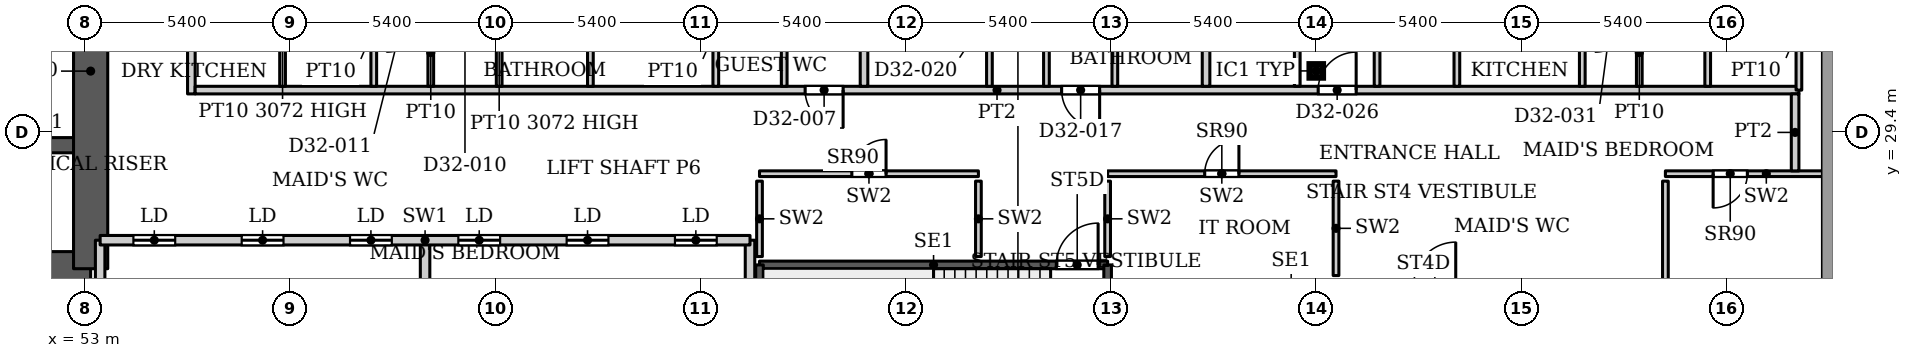
"""IFC4 building model, lengths in metres.
Left out: names, types, materials, properties, quantities, classifications, styles, units other than length and angle.
Written with IfcOpenShell. Run it as: python <this file> out.ifc"""

import sys

from ifc_helpers import new_model, si_unit, direction, frame, frame_2d, origin, origin_2d, place, context, subcontext, project, spatial, rectangle, hollow_rectangle, extrude, source, transform, mapped, element, fill, save


model = new_model("IFC4")
c1 = context("Model", 3, precision=1e-05, world=origin(), true_north=direction((0.0, 1.0)))
c2 = subcontext(c1, "Body", "Model", "MODEL_VIEW")
j1 = project(units=[si_unit("LENGTHUNIT", "METRE"), si_unit("PLANEANGLEUNIT", "RADIAN")], contexts=[c1])
p1 = place(None, origin())
s1 = spatial("IfcSite", under=j1, at=p1, CompositionType="ELEMENT")
p2 = place(p1, origin())
s2 = spatial("IfcBuilding", under=s1, at=p2, CompositionType="ELEMENT")
p3 = place(p2, frame((0.0, 0.0, 140.9)))
s3 = spatial("IfcBuildingStorey", under=s2, at=p3, CompositionType="ELEMENT", Elevation=140.9)
p4 = place(p3, frame((85.4, 31.005, 0.0), z_axis=(0.0, 0.0, 1.0), x_axis=(1.0, 0.0, 0.0)))
e1 = element("IfcColumn", 1, at=p4, inside=s3, PredefinedType="COLUMN", context=c2, shape_type="SweptSolid", body=[
    extrude(hollow_rectangle(XDim=0.356, YDim=0.356, WallThickness=0.016, InnerFilletRadius=0.016, OuterFilletRadius=0.032, at=origin_2d()), origin(), (0.0, 0.0, 1.0), 3.9),
])
p5 = place(p3, frame((34.75, 25.8, 0.0), z_axis=(0.0, 0.0, 1.0), x_axis=(1.0, 0.0, 0.0)))
e2 = element("IfcWall", 2, at=p5, inside=s3, PredefinedType="SHEAR", context=c2, shape_type="SweptSolid", body=[
    extrude(rectangle(XDim=18.4, YDim=0.9, at=frame_2d((9.2, 0.0))), origin(), (0.0, 0.0, 1.0), 3.9),
])
p6 = place(p3, frame((34.75, 29.05, 0.0), z_axis=(0.0, 0.0, 1.0), x_axis=(1.0, 0.0, 0.0)))
e3 = element("IfcWall", 3, at=p6, inside=s3, PredefinedType="SHEAR", context=c2, shape_type="SweptSolid", body=[
    extrude(rectangle(XDim=18.4, YDim=0.4, at=frame_2d((9.2, 0.0))), origin(), (0.0, 0.0, 1.0), 3.9),
])
p7 = place(p6, frame((15.125, 0.0, 0.0)))
e4 = element("IfcOpeningElement", 4, at=p7, cuts=e3, PredefinedType="OPENING", context=c2, shape_type="SweptSolid", body=[
    extrude(rectangle(XDim=1.1, YDim=2.2, at=frame_2d((0.55, 1.1))), frame((0.0, 0.21, 0.0), z_axis=(0.0, -1.0, 0.0), x_axis=(1.0, 0.0, 0.0)), (0.0, 0.0, 1.0), 0.42),
])
p8 = place(p3, frame((53.15, 25.8, 0.0), z_axis=(0.0, 0.0, 1.0), x_axis=(0.0, 1.0, 0.0)))
e5 = element("IfcWall", 5, at=p8, inside=s3, PredefinedType="SHEAR", context=c2, shape_type="SweptSolid", body=[
    extrude(rectangle(XDim=10.4, YDim=0.9, at=frame_2d((5.2, 0.0))), origin(), (0.0, 0.0, 1.0), 3.9),
])
p9 = place(p3, frame((70.75, 25.9, 0.0), z_axis=(0.0, 0.0, 1.0), x_axis=(1.0, 0.0, 0.0)))
e6 = element("IfcWall", 6, at=p9, inside=s3, PredefinedType="SHEAR", context=c2, shape_type="SweptSolid", body=[
    extrude(rectangle(XDim=9.16, YDim=0.2, at=frame_2d((4.58, 0.0))), origin(), (0.0, 0.0, 1.0), 3.9),
])
p10 = place(p9, frame((7.81, 0.0, 0.0)))
e7 = element("IfcOpeningElement", 7, at=p10, cuts=e6, PredefinedType="OPENING", context=c2, shape_type="SweptSolid", body=[
    extrude(rectangle(XDim=1.1, YDim=2.2, at=frame_2d((0.55, 1.1))), frame((0.0, 0.11, 0.0), z_axis=(0.0, -1.0, 0.0), x_axis=(1.0, 0.0, 0.0)), (0.0, 0.0, 1.0), 0.22),
])
for number, where, z_axis, x_axis in (
    (8, (70.75, 22.75, 0.0), (0.0, 0.0, 1.0), (0.0, 1.0, 0.0)),
    (9, (79.91, 22.75, 0.0), (0.0, 0.0, 1.0), (0.0, 1.0, 0.0)),
):
    element("IfcWall", number, at=place(p3, frame(where, z_axis=z_axis, x_axis=x_axis)), inside=s3, PredefinedType="SHEAR", context=c2, shape_type="SweptSolid", body=[
        extrude(rectangle(XDim=3.15, YDim=0.2, at=frame_2d((1.575, 0.0))), origin(), (0.0, 0.0, 1.0), 3.9),
    ])
for number, where, z_axis, x_axis in (
    (10, (53.4, 23.7, 0.0), (0.0, 0.0, 1.0), (0.0, 1.0, 0.0)),
    (11, (61.95, 23.7, 0.0), (0.0, 0.0, 1.0), (0.0, 1.0, 0.0)),
    (12, (70.5, 23.7, 0.0), (0.0, 0.0, 1.0), (0.0, 1.0, 0.0)),
):
    element("IfcWall", number, at=place(p3, frame(where, z_axis=z_axis, x_axis=x_axis)), inside=s3, PredefinedType="PARTITIONING", context=c2, shape_type="SweptSolid", body=[
        extrude(rectangle(XDim=2.85, YDim=0.25, at=frame_2d((1.425, 0.0))), origin(), (0.0, 0.0, 1.0), 3.9),
    ])
p11 = place(p3, frame((53.4, 26.55, 0.0), z_axis=(0.0, 0.0, 1.0), x_axis=(1.0, 0.0, 0.0)))
e13 = element("IfcWall", 13, at=p11, inside=s3, PredefinedType="PARTITIONING", context=c2, shape_type="SweptSolid", body=[
    extrude(rectangle(XDim=17.1, YDim=0.25, at=frame_2d((8.55, 0.0))), origin(), (0.0, 0.0, 1.0), 3.9),
])
p12 = place(p11, frame((0.875, 0.0, 0.0)))
e14 = element("IfcOpeningElement", 14, at=p12, cuts=e13, PredefinedType="OPENING", context=c2, shape_type="SweptSolid", body=[
    extrude(rectangle(XDim=1.1, YDim=2.2, at=frame_2d((0.55, 1.1))), frame((0.0, 0.135, 0.0), z_axis=(0.0, -1.0, 0.0), x_axis=(1.0, 0.0, 0.0)), (0.0, 0.0, 1.0), 0.27),
])
p13 = place(p11, frame((3.725, 0.0, 0.0)))
e15 = element("IfcOpeningElement", 15, at=p13, cuts=e13, PredefinedType="OPENING", context=c2, shape_type="SweptSolid", body=[
    extrude(rectangle(XDim=1.1, YDim=2.2, at=frame_2d((0.55, 1.1))), frame((0.0, 0.135, 0.0), z_axis=(0.0, -1.0, 0.0), x_axis=(1.0, 0.0, 0.0)), (0.0, 0.0, 1.0), 0.27),
])
p14 = place(p11, frame((6.575, 0.0, 0.0)))
e16 = element("IfcOpeningElement", 16, at=p14, cuts=e13, PredefinedType="OPENING", context=c2, shape_type="SweptSolid", body=[
    extrude(rectangle(XDim=1.1, YDim=2.2, at=frame_2d((0.55, 1.1))), frame((0.0, 0.135, 0.0), z_axis=(0.0, -1.0, 0.0), x_axis=(1.0, 0.0, 0.0)), (0.0, 0.0, 1.0), 0.27),
])
p15 = place(p11, frame((9.425, 0.0, 0.0)))
e17 = element("IfcOpeningElement", 17, at=p15, cuts=e13, PredefinedType="OPENING", context=c2, shape_type="SweptSolid", body=[
    extrude(rectangle(XDim=1.1, YDim=2.2, at=frame_2d((0.55, 1.1))), frame((0.0, 0.135, 0.0), z_axis=(0.0, -1.0, 0.0), x_axis=(1.0, 0.0, 0.0)), (0.0, 0.0, 1.0), 0.27),
])
p16 = place(p11, frame((12.275, 0.0, 0.0)))
e18 = element("IfcOpeningElement", 18, at=p16, cuts=e13, PredefinedType="OPENING", context=c2, shape_type="SweptSolid", body=[
    extrude(rectangle(XDim=1.1, YDim=2.2, at=frame_2d((0.55, 1.1))), frame((0.0, 0.135, 0.0), z_axis=(0.0, -1.0, 0.0), x_axis=(1.0, 0.0, 0.0)), (0.0, 0.0, 1.0), 0.27),
])
p17 = place(p11, frame((15.125, 0.0, 0.0)))
e19 = element("IfcOpeningElement", 19, at=p17, cuts=e13, PredefinedType="OPENING", context=c2, shape_type="SweptSolid", body=[
    extrude(rectangle(XDim=1.1, YDim=2.2, at=frame_2d((0.55, 1.1))), frame((0.0, 0.135, 0.0), z_axis=(0.0, -1.0, 0.0), x_axis=(1.0, 0.0, 0.0)), (0.0, 0.0, 1.0), 0.27),
])
p18 = place(p3, frame((70.75, 28.3, 0.0), z_axis=(0.0, 0.0, 1.0), x_axis=(1.0, 0.0, 0.0)))
e20 = element("IfcWall", 20, at=p18, inside=s3, PredefinedType="PARTITIONING", context=c2, shape_type="SweptSolid", body=[
    extrude(rectangle(XDim=5.76, YDim=0.15, at=frame_2d((2.88, 0.0))), origin(), (0.0, 0.0, 1.0), 3.9),
])
p19 = place(p18, frame((2.43, 0.0, 0.0)))
e21 = element("IfcOpeningElement", 21, at=p19, cuts=e20, PredefinedType="OPENING", context=c2, shape_type="SweptSolid", body=[
    extrude(rectangle(XDim=0.9, YDim=2.2, at=frame_2d((0.45, 1.1))), frame((0.0, 0.085, 0.0), z_axis=(0.0, -1.0, 0.0), x_axis=(1.0, 0.0, 0.0)), (0.0, 0.0, 1.0), 0.17),
])
for number, where, z_axis, x_axis in (
    (22, (70.75, 26.12, 0.0), (0.0, 0.0, 1.0), (0.0, 1.0, 0.0)),
    (23, (76.51, 26.12, 0.0), (0.0, 0.0, 1.0), (0.0, 1.0, 0.0)),
):
    element("IfcWall", number, at=place(p3, frame(where, z_axis=z_axis, x_axis=x_axis)), inside=s3, PredefinedType="PARTITIONING", context=c2, shape_type="SweptSolid", body=[
        extrude(rectangle(XDim=1.985, YDim=0.15, at=frame_2d((0.992, 0.0))), origin(), (0.0, 0.0, 1.0), 3.9),
    ])
p20 = place(p3, frame((79.91, 28.3, 0.0), z_axis=(0.0, 0.0, 1.0), x_axis=(1.0, 0.0, 0.0)))
e24 = element("IfcWall", 24, at=p20, inside=s3, PredefinedType="PARTITIONING", context=c2, shape_type="SweptSolid", body=[
    extrude(rectangle(XDim=6.01, YDim=0.15, at=frame_2d((3.005, 0.0))), origin(), (0.0, 0.0, 1.0), 3.9),
])
p21 = place(p20, frame((2.555, 0.0, 0.0)))
e25 = element("IfcOpeningElement", 25, at=p21, cuts=e24, PredefinedType="OPENING", context=c2, shape_type="SweptSolid", body=[
    extrude(rectangle(XDim=0.9, YDim=2.2, at=frame_2d((0.45, 1.1))), frame((0.0, 0.085, 0.0), z_axis=(0.0, -1.0, 0.0), x_axis=(1.0, 0.0, 0.0)), (0.0, 0.0, 1.0), 0.17),
])
p22 = place(p3, frame((79.91, 26.12, 0.0), z_axis=(0.0, 0.0, 1.0), x_axis=(0.0, 1.0, 0.0)))
e26 = element("IfcWall", 26, at=p22, inside=s3, PredefinedType="PARTITIONING", context=c2, shape_type="SweptSolid", body=[
    extrude(rectangle(XDim=1.985, YDim=0.15, at=frame_2d((0.992, 0.0))), origin(), (0.0, 0.0, 1.0), 3.9),
])
p23 = place(p3, frame((85.92, 25.62, 0.0), z_axis=(0.0, 0.0, 1.0), x_axis=(0.0, 1.0, 0.0)))
e27 = element("IfcWall", 27, at=p23, inside=s3, PredefinedType="PARTITIONING", context=c2, shape_type="SweptSolid", body=[
    extrude(rectangle(XDim=2.485, YDim=0.15, at=frame_2d((1.242, 0.0))), origin(), (0.0, 0.0, 1.0), 3.9),
])
p24 = place(p3, frame((94.587, 28.3, 0.0), z_axis=(0.0, 0.0, 1.0), x_axis=(1.0, 0.0, 0.0)))
e28 = element("IfcWall", 28, at=p24, inside=s3, PredefinedType="PARTITIONING", context=c2, shape_type="SweptSolid", body=[
    extrude(rectangle(XDim=5.311, YDim=0.15, at=frame_2d((2.656, 0.0))), origin(), (0.0, 0.0, 1.0), 3.9),
])
p25 = place(p24, frame((1.256, 0.0, 0.0)))
e29 = element("IfcOpeningElement", 29, at=p25, cuts=e28, PredefinedType="OPENING", context=c2, shape_type="SweptSolid", body=[
    extrude(rectangle(XDim=0.9, YDim=2.2, at=frame_2d((0.45, 1.1))), frame((0.0, 0.085, 0.0), z_axis=(0.0, -1.0, 0.0), x_axis=(1.0, 0.0, 0.0)), (0.0, 0.0, 1.0), 0.17),
])
p26 = place(p3, frame((94.587, 21.293, 0.0), z_axis=(0.0, 0.0, 1.0), x_axis=(0.0, 1.0, 0.0)))
e30 = element("IfcWall", 30, at=p26, inside=s3, PredefinedType="PARTITIONING", context=c2, shape_type="SweptSolid", body=[
    extrude(rectangle(XDim=6.812, YDim=0.15, at=frame_2d((3.406, 0.0))), origin(), (0.0, 0.0, 1.0), 3.9),
])
p27 = place(p3, frame((55.8, 30.4, 0.0), z_axis=(0.0, 0.0, 1.0), x_axis=(0.0, 1.0, 0.0)))
e31 = element("IfcWall", 31, at=p27, inside=s3, PredefinedType="PARTITIONING", context=c2, shape_type="SweptSolid", body=[
    extrude(rectangle(XDim=13.5, YDim=0.2, at=frame_2d((6.75, 0.0))), origin(), (0.0, 0.0, 1.0), 3.6),
])
p28 = place(p3, frame((55.9, 30.5, 0.0), z_axis=(0.0, 0.0, 1.0), x_axis=(1.0, 0.0, 0.0)))
e32 = element("IfcWall", 32, at=p28, inside=s3, PredefinedType="PARTITIONING", context=c2, shape_type="SweptSolid", body=[
    extrude(rectangle(XDim=42.2, YDim=0.2, at=frame_2d((21.1, 0.0))), origin(), (0.0, 0.0, 1.0), 3.6),
])
p29 = place(p28, frame((16.05, 0.0, 0.0)))
e33 = element("IfcOpeningElement", 33, at=p29, cuts=e32, PredefinedType="OPENING", context=c2, shape_type="SweptSolid", body=[
    extrude(rectangle(XDim=1.0, YDim=2.1, at=frame_2d((0.5, 1.05))), frame((0.0, 0.11, 0.0), z_axis=(0.0, -1.0, 0.0), x_axis=(1.0, 0.0, 0.0)), (0.0, 0.0, 1.0), 0.22),
])
p30 = place(p28, frame((22.8, 0.0, 0.0)))
e34 = element("IfcOpeningElement", 34, at=p30, cuts=e32, PredefinedType="OPENING", context=c2, shape_type="SweptSolid", body=[
    extrude(rectangle(XDim=1.0, YDim=2.1, at=frame_2d((0.5, 1.05))), frame((0.0, 0.11, 0.0), z_axis=(0.0, -1.0, 0.0), x_axis=(1.0, 0.0, 0.0)), (0.0, 0.0, 1.0), 0.22),
])
p31 = place(p28, frame((29.55, 0.0, 0.0)))
e35 = element("IfcOpeningElement", 35, at=p31, cuts=e32, PredefinedType="OPENING", context=c2, shape_type="SweptSolid", body=[
    extrude(rectangle(XDim=1.0, YDim=2.1, at=frame_2d((0.5, 1.05))), frame((0.0, 0.11, 0.0), z_axis=(0.0, -1.0, 0.0), x_axis=(1.0, 0.0, 0.0)), (0.0, 0.0, 1.0), 0.22),
])
p32 = place(p3, frame((58.2, 30.6, 0.0), z_axis=(0.0, 0.0, 1.0), x_axis=(0.0, 1.0, 0.0)))
e36 = element("IfcWall", 36, at=p32, inside=s3, PredefinedType="PARTITIONING", context=c2, shape_type="SweptSolid", body=[
    extrude(rectangle(XDim=3.025, YDim=0.15, at=frame_2d((1.512, 0.0))), origin(), (0.0, 0.0, 1.0), 3.072),
])
p33 = place(p3, frame((60.6, 30.6, 0.0), z_axis=(0.0, 0.0, 1.0), x_axis=(0.0, 1.0, 0.0)))
e37 = element("IfcWall", 37, at=p33, inside=s3, PredefinedType="PARTITIONING", context=c2, shape_type="SweptSolid", body=[
    extrude(rectangle(XDim=3.025, YDim=0.15, at=frame_2d((1.512, 0.0))), origin(), (0.0, 0.0, 1.0), 3.6),
])
p34 = place(p3, frame((62.1, 30.6, 0.0), z_axis=(0.0, 0.0, 1.0), x_axis=(0.0, 1.0, 0.0)))
e38 = element("IfcWall", 38, at=p34, inside=s3, PredefinedType="PARTITIONING", context=c2, shape_type="SweptSolid", body=[
    extrude(rectangle(XDim=1.775, YDim=0.15, at=frame_2d((0.887, 0.0))), origin(), (0.0, 0.0, 1.0), 3.6),
])
p35 = place(p3, frame((63.9, 30.6, 0.0), z_axis=(0.0, 0.0, 1.0), x_axis=(0.0, 1.0, 0.0)))
e39 = element("IfcWall", 39, at=p35, inside=s3, PredefinedType="PARTITIONING", context=c2, shape_type="SweptSolid", body=[
    extrude(rectangle(XDim=3.025, YDim=0.15, at=frame_2d((1.512, 0.0))), origin(), (0.0, 0.0, 1.0), 3.072),
])
for number, where, z_axis, x_axis in (
    (40, (66.3, 30.6, 0.0), (0.0, 0.0, 1.0), (0.0, 1.0, 0.0)),
    (41, (69.6, 30.6, 0.0), (0.0, 0.0, 1.0), (0.0, 1.0, 0.0)),
    (42, (71.4, 30.6, 0.0), (0.0, 0.0, 1.0), (0.0, 1.0, 0.0)),
):
    element("IfcWall", number, at=place(p3, frame(where, z_axis=z_axis, x_axis=x_axis)), inside=s3, PredefinedType="PARTITIONING", context=c2, shape_type="SweptSolid", body=[
        extrude(rectangle(XDim=3.025, YDim=0.15, at=frame_2d((1.512, 0.0))), origin(), (0.0, 0.0, 1.0), 3.6),
    ])
p36 = place(p3, frame((73.5, 30.6, 0.0), z_axis=(0.0, 0.0, 1.0), x_axis=(0.0, 1.0, 0.0)))
e43 = element("IfcWall", 43, at=p36, inside=s3, PredefinedType="PARTITIONING", context=c2, shape_type="SweptSolid", body=[
    extrude(rectangle(XDim=13.3, YDim=0.2, at=frame_2d((6.65, 0.0))), origin(), (0.0, 0.0, 1.0), 3.6),
])
for number, where, z_axis, x_axis in (
    (44, (76.8, 30.6, 0.0), (0.0, 0.0, 1.0), (0.0, 1.0, 0.0)),
    (45, (78.3, 30.6, 0.0), (0.0, 0.0, 1.0), (0.0, 1.0, 0.0)),
):
    element("IfcWall", number, at=place(p3, frame(where, z_axis=z_axis, x_axis=x_axis)), inside=s3, PredefinedType="PARTITIONING", context=c2, shape_type="SweptSolid", body=[
        extrude(rectangle(XDim=3.025, YDim=0.15, at=frame_2d((1.512, 0.0))), origin(), (0.0, 0.0, 1.0), 3.6),
    ])
p37 = place(p3, frame((80.1, 30.6, 0.0), z_axis=(0.0, 0.0, 1.0), x_axis=(0.0, 1.0, 0.0)))
e46 = element("IfcWall", 46, at=p37, inside=s3, PredefinedType="PARTITIONING", context=c2, shape_type="SweptSolid", body=[
    extrude(rectangle(XDim=3.175, YDim=0.15, at=frame_2d((1.587, 0.0))), origin(), (0.0, 0.0, 1.0), 3.6),
])
p38 = place(p3, frame((82.5, 30.6, 0.0), z_axis=(0.0, 0.0, 1.0), x_axis=(0.0, 1.0, 0.0)))
e47 = element("IfcWall", 47, at=p38, inside=s3, PredefinedType="PARTITIONING", context=c2, shape_type="SweptSolid", body=[
    extrude(rectangle(XDim=13.3, YDim=0.2, at=frame_2d((6.65, 0.0))), origin(), (0.0, 0.0, 1.0), 3.6),
])
p39 = place(p3, frame((84.9, 30.6, 0.0), z_axis=(0.0, 0.0, 1.0), x_axis=(0.0, 1.0, 0.0)))
e48 = element("IfcWall", 48, at=p39, inside=s3, PredefinedType="PARTITIONING", context=c2, shape_type="SweptSolid", body=[
    extrude(rectangle(XDim=3.175, YDim=0.15, at=frame_2d((1.587, 0.0))), origin(), (0.0, 0.0, 1.0), 3.6),
])
for number, where, z_axis, x_axis in (
    (49, (87.0, 30.6, 0.0), (0.0, 0.0, 1.0), (0.0, 1.0, 0.0)),
    (50, (89.1, 30.6, 0.0), (0.0, 0.0, 1.0), (0.0, 1.0, 0.0)),
    (51, (92.4, 30.6, 0.0), (0.0, 0.0, 1.0), (0.0, 1.0, 0.0)),
):
    element("IfcWall", number, at=place(p3, frame(where, z_axis=z_axis, x_axis=x_axis)), inside=s3, PredefinedType="PARTITIONING", context=c2, shape_type="SweptSolid", body=[
        extrude(rectangle(XDim=3.025, YDim=0.15, at=frame_2d((1.512, 0.0))), origin(), (0.0, 0.0, 1.0), 3.6),
    ])
p40 = place(p3, frame((93.9, 30.6, 0.0), z_axis=(0.0, 0.0, 1.0), x_axis=(0.0, 1.0, 0.0)))
e52 = element("IfcWall", 52, at=p40, inside=s3, PredefinedType="PARTITIONING", context=c2, shape_type="SweptSolid", body=[
    extrude(rectangle(XDim=1.775, YDim=0.15, at=frame_2d((0.887, 0.0))), origin(), (0.0, 0.0, 1.0), 3.6),
])
p41 = place(p3, frame((95.7, 30.6, 0.0), z_axis=(0.0, 0.0, 1.0), x_axis=(0.0, 1.0, 0.0)))
e53 = element("IfcWall", 53, at=p41, inside=s3, PredefinedType="PARTITIONING", context=c2, shape_type="SweptSolid", body=[
    extrude(rectangle(XDim=3.025, YDim=0.15, at=frame_2d((1.512, 0.0))), origin(), (0.0, 0.0, 1.0), 3.6),
])
p42 = place(p3, frame((98.0, 28.374, 0.0), z_axis=(0.0, 0.0, 1.0), x_axis=(0.0, 1.0, 0.0)))
e54 = element("IfcWall", 54, at=p42, inside=s3, PredefinedType="PARTITIONING", context=c2, shape_type="SweptSolid", body=[
    extrude(rectangle(XDim=2.026, YDim=0.2, at=frame_2d((1.013, 0.0))), origin(), (0.0, 0.0, 1.0), 3.6),
])
p43 = place(p3, frame((98.1, 30.5, 0.0), z_axis=(0.0, 0.0, 1.0), x_axis=(0.0, 1.0, 0.0)))
e55 = element("IfcWall", 55, at=p43, inside=s3, PredefinedType="PARTITIONING", context=c2, shape_type="SweptSolid", body=[
    extrude(rectangle(XDim=3.275, YDim=0.15, at=frame_2d((1.637, 0.0))), origin(), (0.0, 0.0, 1.0), 3.6),
])
m1 = source(origin(), c2, "Body", "SweptSolid", [
    extrude(rectangle(XDim=1.1, YDim=2.2, at=frame_2d((0.55, 1.1))), frame((0.0, 0.025, 0.0), z_axis=(0.0, -1.0, 0.0), x_axis=(1.0, 0.0, 0.0)), (0.0, 0.0, 1.0), 0.05),
])
p44 = place(p12, origin())
e56 = element("IfcDoor", 56, at=p44, inside=s3, OperationType="SLIDING_TO_LEFT", PredefinedType="DOOR", context=c2, shape_type="MappedRepresentation", body=[
    mapped(m1, transform((0.0, 0.0, 0.0), x_axis=(1.0, 0.0, 0.0), y_axis=(0.0, 1.0, 0.0), z_axis=(0.0, 0.0, 1.0), scale=1.0)),
])
fill(e14, e56)
p45 = place(p13, origin())
e57 = element("IfcDoor", 57, at=p45, inside=s3, OperationType="SLIDING_TO_LEFT", PredefinedType="DOOR", context=c2, shape_type="MappedRepresentation", body=[
    mapped(m1, transform((0.0, 0.0, 0.0), x_axis=(1.0, 0.0, 0.0), y_axis=(0.0, 1.0, 0.0), z_axis=(0.0, 0.0, 1.0), scale=1.0)),
])
fill(e15, e57)
p46 = place(p14, origin())
e58 = element("IfcDoor", 58, at=p46, inside=s3, OperationType="SLIDING_TO_LEFT", PredefinedType="DOOR", context=c2, shape_type="MappedRepresentation", body=[
    mapped(m1, transform((0.0, 0.0, 0.0), x_axis=(1.0, 0.0, 0.0), y_axis=(0.0, 1.0, 0.0), z_axis=(0.0, 0.0, 1.0), scale=1.0)),
])
fill(e16, e58)
p47 = place(p15, origin())
e59 = element("IfcDoor", 59, at=p47, inside=s3, OperationType="SLIDING_TO_LEFT", PredefinedType="DOOR", context=c2, shape_type="MappedRepresentation", body=[
    mapped(m1, transform((0.0, 0.0, 0.0), x_axis=(1.0, 0.0, 0.0), y_axis=(0.0, 1.0, 0.0), z_axis=(0.0, 0.0, 1.0), scale=1.0)),
])
fill(e17, e59)
p48 = place(p16, origin())
e60 = element("IfcDoor", 60, at=p48, inside=s3, OperationType="SLIDING_TO_LEFT", PredefinedType="DOOR", context=c2, shape_type="MappedRepresentation", body=[
    mapped(m1, transform((0.0, 0.0, 0.0), x_axis=(1.0, 0.0, 0.0), y_axis=(0.0, 1.0, 0.0), z_axis=(0.0, 0.0, 1.0), scale=1.0)),
])
fill(e18, e60)
p49 = place(p17, origin())
e61 = element("IfcDoor", 61, at=p49, inside=s3, OperationType="SLIDING_TO_LEFT", PredefinedType="DOOR", context=c2, shape_type="MappedRepresentation", body=[
    mapped(m1, transform((0.0, 0.0, 0.0), x_axis=(1.0, 0.0, 0.0), y_axis=(0.0, 1.0, 0.0), z_axis=(0.0, 0.0, 1.0), scale=1.0)),
])
fill(e19, e61)
m2 = source(origin(), c2, "Body", "SweptSolid", [
    extrude(rectangle(XDim=0.9, YDim=2.2, at=frame_2d((0.45, 1.1))), frame((0.0, 0.025, 0.0), z_axis=(0.0, -1.0, 0.0), x_axis=(1.0, 0.0, 0.0)), (0.0, 0.0, 1.0), 0.05),
])
p50 = place(p19, origin())
e62 = element("IfcDoor", 62, at=p50, inside=s3, OperationType="SINGLE_SWING_LEFT", PredefinedType="DOOR", context=c2, shape_type="MappedRepresentation", body=[
    mapped(m2, transform((0.0, 0.0, 0.0), x_axis=(1.0, 0.0, 0.0), y_axis=(0.0, 1.0, 0.0), z_axis=(0.0, 0.0, 1.0), scale=1.0)),
])
fill(e21, e62)
p51 = place(p21, origin())
e63 = element("IfcDoor", 63, at=p51, inside=s3, OperationType="SINGLE_SWING_LEFT", PredefinedType="DOOR", context=c2, shape_type="MappedRepresentation", body=[
    mapped(m2, transform((0.0, 0.0, 0.0), x_axis=(1.0, 0.0, 0.0), y_axis=(0.0, 1.0, 0.0), z_axis=(0.0, 0.0, 1.0), scale=1.0)),
])
fill(e25, e63)
p52 = place(p25, origin())
e64 = element("IfcDoor", 64, at=p52, inside=s3, OperationType="SINGLE_SWING_RIGHT", PredefinedType="DOOR", context=c2, shape_type="MappedRepresentation", body=[
    mapped(m2, transform((0.0, 0.0, 0.0), x_axis=(1.0, 0.0, 0.0), y_axis=(0.0, 1.0, 0.0), z_axis=(0.0, 0.0, 1.0), scale=1.0)),
])
fill(e29, e64)
m3 = source(origin(), c2, "Body", "SweptSolid", [
    extrude(rectangle(XDim=1.1, YDim=2.2, at=frame_2d((0.55, 1.1))), frame((0.0, 0.025, 0.0), z_axis=(0.0, -1.0, 0.0), x_axis=(1.0, 0.0, 0.0)), (0.0, 0.0, 1.0), 0.05),
])
p53 = place(p10, origin())
e65 = element("IfcDoor", 65, at=p53, inside=s3, OperationType="SINGLE_SWING_LEFT", PredefinedType="DOOR", context=c2, shape_type="MappedRepresentation", body=[
    mapped(m3, transform((0.0, 0.0, 0.0), x_axis=(1.0, 0.0, 0.0), y_axis=(0.0, 1.0, 0.0), z_axis=(0.0, 0.0, 1.0), scale=1.0)),
])
fill(e7, e65)
m4 = source(origin(), c2, "Body", "SweptSolid", [
    extrude(rectangle(XDim=1.0, YDim=2.1, at=frame_2d((0.5, 1.05))), frame((0.0, 0.025, 0.0), z_axis=(0.0, -1.0, 0.0), x_axis=(1.0, 0.0, 0.0)), (0.0, 0.0, 1.0), 0.05),
])
p54 = place(p29, origin())
e66 = element("IfcDoor", 66, at=p54, inside=s3, OperationType="SINGLE_SWING_RIGHT", PredefinedType="DOOR", context=c2, shape_type="MappedRepresentation", body=[
    mapped(m4, transform((0.0, 0.0, 0.0), x_axis=(1.0, 0.0, 0.0), y_axis=(0.0, 1.0, 0.0), z_axis=(0.0, 0.0, 1.0), scale=1.0)),
])
fill(e33, e66)
p55 = place(p30, origin())
e67 = element("IfcDoor", 67, at=p55, inside=s3, OperationType="SINGLE_SWING_RIGHT", PredefinedType="DOOR", context=c2, shape_type="MappedRepresentation", body=[
    mapped(m4, transform((0.0, 0.0, 0.0), x_axis=(1.0, 0.0, 0.0), y_axis=(0.0, 1.0, 0.0), z_axis=(0.0, 0.0, 1.0), scale=1.0)),
])
fill(e34, e67)
p56 = place(p31, origin())
e68 = element("IfcDoor", 68, at=p56, inside=s3, OperationType="SINGLE_SWING_LEFT", PredefinedType="DOOR", context=c2, shape_type="MappedRepresentation", body=[
    mapped(m4, transform((0.0, 0.0, 0.0), x_axis=(1.0, 0.0, 0.0), y_axis=(0.0, 1.0, 0.0), z_axis=(0.0, 0.0, 1.0), scale=1.0)),
])
fill(e35, e68)
save(model, sys.argv[1])
